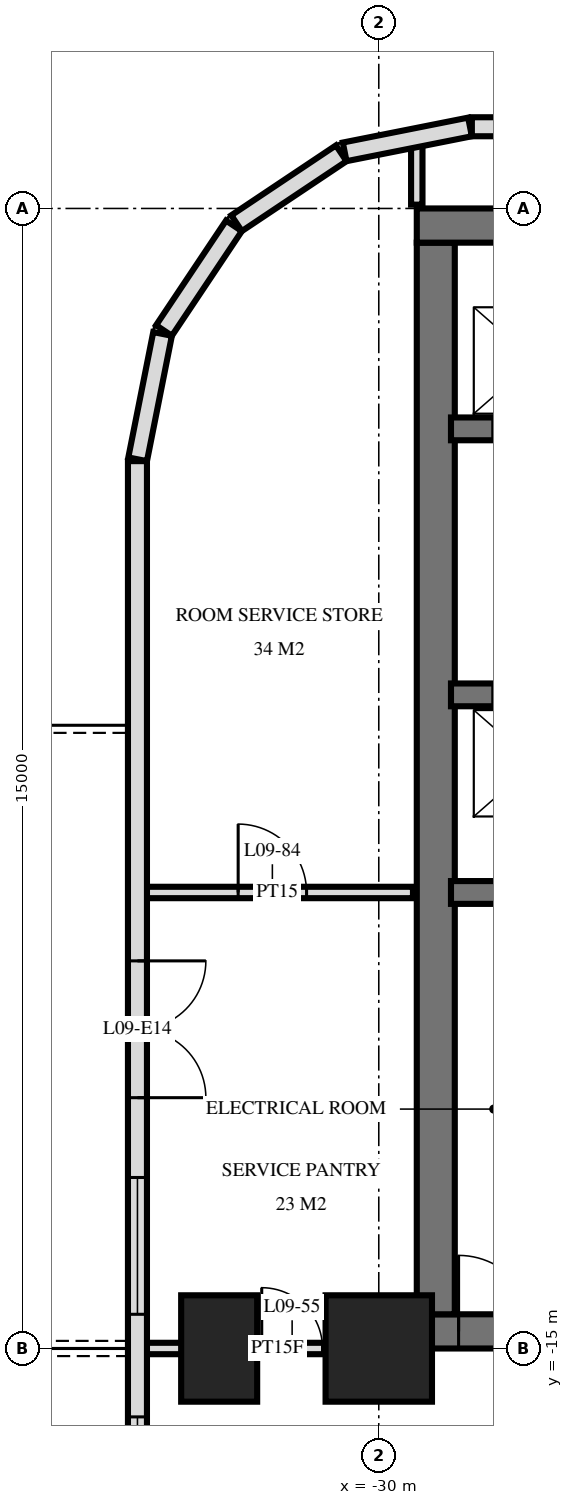
"""IFC4 building model, lengths in metres.
Left out: names, types, materials, properties, quantities, classifications, styles, units other than length and angle.
Written with IfcOpenShell. Run it as: python <this file> out.ifc"""

import sys

from ifc_helpers import new_model, si_unit, direction, frame, frame_2d, origin, origin_2d, place, context, subcontext, project, spatial, rectangle, extrude, element, fill, save


model = new_model("IFC4")
c1 = context("Model", 3, precision=1e-05, world=origin(), true_north=direction((0.0, 1.0)))
c2 = subcontext(c1, "Body", "Model", "MODEL_VIEW")
j1 = project(units=[si_unit("LENGTHUNIT", "METRE"), si_unit("PLANEANGLEUNIT", "RADIAN")], contexts=[c1])
p1 = place(None, origin())
s1 = spatial("IfcSite", under=j1, at=p1, CompositionType="ELEMENT")
p2 = place(p1, origin())
s2 = spatial("IfcBuilding", under=s1, at=p2, CompositionType="ELEMENT")
p3 = place(p2, frame((0.0, 0.0, 42.0)))
s3 = spatial("IfcBuildingStorey", under=s2, at=p3, CompositionType="ELEMENT", Elevation=42.0)
p4 = place(p3, frame((-32.1, -15.0, 0.0), z_axis=(0.0, 0.0, 1.0), x_axis=(0.0, 1.0, 0.0)))
e1 = element("IfcColumn", 1, at=p4, inside=s3, PredefinedType="COLUMN", context=c2, shape_type="SweptSolid", body=[
    extrude(rectangle(XDim=1.4, YDim=1.0, at=origin_2d()), origin(), (0.0, 0.0, 1.0), 3.6),
])
p5 = place(p3, frame((-30.0, -15.0, 0.0), z_axis=(0.0, 0.0, 1.0), x_axis=(1.0, 0.0, 0.0)))
e2 = element("IfcColumn", 2, at=p5, inside=s3, PredefinedType="COLUMN", context=c2, shape_type="SweptSolid", body=[
    extrude(rectangle(XDim=1.4, YDim=1.4, at=origin_2d()), origin(), (0.0, 0.0, 1.0), 3.6),
])
p6 = place(p3, frame((-29.5, -0.225, 0.0), z_axis=(0.0, 0.0, 1.0), x_axis=(1.0, 0.0, 0.0)))
e3 = element("IfcWall", 3, at=p6, inside=s3, PredefinedType="SHEAR", context=c2, shape_type="SweptSolid", body=[
    extrude(rectangle(XDim=19.5, YDim=0.45, at=frame_2d((9.75, 0.0))), origin(), (0.0, 0.0, 1.0), 3.6),
])
p7 = place(p3, frame((-29.5, -14.775, 0.0), z_axis=(0.0, 0.0, 1.0), x_axis=(1.0, 0.0, 0.0)))
e4 = element("IfcWall", 4, at=p7, inside=s3, PredefinedType="SHEAR", context=c2, shape_type="SweptSolid", body=[
    extrude(rectangle(XDim=19.5, YDim=0.45, at=frame_2d((9.75, 0.0))), origin(), (0.0, 0.0, 1.0), 3.6),
])
p8 = place(p7, frame((11.2, 0.0, 0.0)))
e5 = element("IfcOpeningElement", 5, at=p8, cuts=e4, PredefinedType="OPENING", context=c2, shape_type="SweptSolid", body=[
    extrude(rectangle(XDim=1.2, YDim=2.1, at=frame_2d((0.6, 1.05))), frame((0.0, 0.235, 0.0), z_axis=(0.0, -1.0, 0.0), x_axis=(1.0, 0.0, 0.0)), (0.0, 0.0, 1.0), 0.47),
])
p9 = place(p7, frame((14.25, 0.0, 0.0)))
e6 = element("IfcOpeningElement", 6, at=p9, cuts=e4, PredefinedType="OPENING", context=c2, shape_type="SweptSolid", body=[
    extrude(rectangle(XDim=1.1, YDim=2.1, at=frame_2d((0.55, 1.05))), frame((0.0, 0.235, 0.0), z_axis=(0.0, -1.0, 0.0), x_axis=(1.0, 0.0, 0.0)), (0.0, 0.0, 1.0), 0.47),
])
p10 = place(p7, frame((8.5, 0.0, 0.0)))
e7 = element("IfcOpeningElement", 7, at=p10, cuts=e4, PredefinedType="OPENING", context=c2, shape_type="SweptSolid", body=[
    extrude(rectangle(XDim=0.9, YDim=2.1, at=frame_2d((0.45, 1.05))), frame((0.0, 0.235, 0.0), z_axis=(0.0, -1.0, 0.0), x_axis=(1.0, 0.0, 0.0)), (0.0, 0.0, 1.0), 0.47),
])
p11 = place(p7, frame((6.05, 0.0, 0.0)))
e8 = element("IfcOpeningElement", 8, at=p11, cuts=e4, PredefinedType="OPENING", context=c2, shape_type="SweptSolid", body=[
    extrude(rectangle(XDim=1.0, YDim=2.1, at=frame_2d((0.5, 1.05))), frame((0.0, 0.235, 0.0), z_axis=(0.0, -1.0, 0.0), x_axis=(1.0, 0.0, 0.0)), (0.0, 0.0, 1.0), 0.47),
])
p12 = place(p7, frame((3.587, 0.0, 0.0)))
e9 = element("IfcOpeningElement", 9, at=p12, cuts=e4, PredefinedType="OPENING", context=c2, shape_type="SweptSolid", body=[
    extrude(rectangle(XDim=1.0, YDim=2.1, at=frame_2d((0.5, 1.05))), frame((0.0, 0.235, 0.0), z_axis=(0.0, -1.0, 0.0), x_axis=(1.0, 0.0, 0.0)), (0.0, 0.0, 1.0), 0.47),
])
p13 = place(p7, frame((1.85, 0.0, 0.0)))
e10 = element("IfcOpeningElement", 10, at=p13, cuts=e4, PredefinedType="OPENING", context=c2, shape_type="SweptSolid", body=[
    extrude(rectangle(XDim=1.0, YDim=2.1, at=frame_2d((0.5, 1.05))), frame((0.0, 0.235, 0.0), z_axis=(0.0, -1.0, 0.0), x_axis=(1.0, 0.0, 0.0)), (0.0, 0.0, 1.0), 0.47),
])
p14 = place(p7, frame((0.55, 0.0, 0.0)))
e11 = element("IfcOpeningElement", 11, at=p14, cuts=e4, PredefinedType="OPENING", context=c2, shape_type="SweptSolid", body=[
    extrude(rectangle(XDim=1.0, YDim=2.1, at=frame_2d((0.5, 1.05))), frame((0.0, 0.235, 0.0), z_axis=(0.0, -1.0, 0.0), x_axis=(1.0, 0.0, 0.0)), (0.0, 0.0, 1.0), 0.47),
])
p15 = place(p3, frame((-29.25, -14.55, 0.0), z_axis=(0.0, 0.0, 1.0), x_axis=(0.0, 1.0, 0.0)))
e12 = element("IfcWall", 12, at=p15, inside=s3, PredefinedType="SHEAR", context=c2, shape_type="SweptSolid", body=[
    extrude(rectangle(XDim=14.1, YDim=0.5, at=frame_2d((7.05, 0.0))), origin(), (0.0, 0.0, 1.0), 3.6),
])
p16 = place(p3, frame((-29.05, -2.9, 0.0), z_axis=(0.0, 0.0, 1.0), x_axis=(1.0, 0.0, 0.0)))
e13 = element("IfcWall", 13, at=p16, inside=s3, PredefinedType="SHEAR", context=c2, shape_type="SweptSolid", body=[
    extrude(rectangle(XDim=18.7, YDim=0.3, at=frame_2d((9.35, 0.0))), origin(), (0.0, 0.0, 1.0), 3.6),
])
p17 = place(p16, frame((2.95, 0.0, 0.0)))
e14 = element("IfcOpeningElement", 14, at=p17, cuts=e13, PredefinedType="OPENING", context=c2, shape_type="SweptSolid", body=[
    extrude(rectangle(XDim=1.1, YDim=2.1, at=frame_2d((0.55, 1.05))), frame((0.0, 0.16, 0.0), z_axis=(0.0, -1.0, 0.0), x_axis=(1.0, 0.0, 0.0)), (0.0, 0.0, 1.0), 0.32),
])
p18 = place(p16, frame((0.55, 0.0, 0.0)))
e15 = element("IfcOpeningElement", 15, at=p18, cuts=e13, PredefinedType="OPENING", context=c2, shape_type="SweptSolid", body=[
    extrude(rectangle(XDim=1.1, YDim=2.1, at=frame_2d((0.55, 1.05))), frame((0.0, 0.16, 0.0), z_axis=(0.0, -1.0, 0.0), x_axis=(1.0, 0.0, 0.0)), (0.0, 0.0, 1.0), 0.32),
])
p19 = place(p16, frame((10.9, 0.0, 0.0)))
e16 = element("IfcOpeningElement", 16, at=p19, cuts=e13, PredefinedType="OPENING", context=c2, shape_type="SweptSolid", body=[
    extrude(rectangle(XDim=0.9, YDim=2.1, at=frame_2d((0.45, 1.05))), frame((0.0, 0.16, 0.0), z_axis=(0.0, -1.0, 0.0), x_axis=(1.0, 0.0, 0.0)), (0.0, 0.0, 1.0), 0.32),
])
p20 = place(p16, frame((16.85, 0.0, 0.0)))
e17 = element("IfcOpeningElement", 17, at=p20, cuts=e13, PredefinedType="OPENING", context=c2, shape_type="SweptSolid", body=[
    extrude(rectangle(XDim=1.0, YDim=2.1, at=frame_2d((0.5, 1.05))), frame((0.0, 0.16, 0.0), z_axis=(0.0, -1.0, 0.0), x_axis=(1.0, 0.0, 0.0)), (0.0, 0.0, 1.0), 0.32),
])
p21 = place(p16, frame((14.312, 0.0, 0.0)))
e18 = element("IfcOpeningElement", 18, at=p21, cuts=e13, PredefinedType="OPENING", context=c2, shape_type="SweptSolid", body=[
    extrude(rectangle(XDim=1.0, YDim=2.1, at=frame_2d((0.5, 1.05))), frame((0.0, 0.16, 0.0), z_axis=(0.0, -1.0, 0.0), x_axis=(1.0, 0.0, 0.0)), (0.0, 0.0, 1.0), 0.32),
])
p22 = place(p16, frame((12.887, 0.0, 0.0)))
e19 = element("IfcOpeningElement", 19, at=p22, cuts=e13, PredefinedType="OPENING", context=c2, shape_type="SweptSolid", body=[
    extrude(rectangle(XDim=1.0, YDim=2.1, at=frame_2d((0.5, 1.05))), frame((0.0, 0.16, 0.0), z_axis=(0.0, -1.0, 0.0), x_axis=(1.0, 0.0, 0.0)), (0.0, 0.0, 1.0), 0.32),
])
p23 = place(p16, frame((5.6, 0.0, 0.0)))
e20 = element("IfcOpeningElement", 20, at=p23, cuts=e13, PredefinedType="OPENING", context=c2, shape_type="SweptSolid", body=[
    extrude(rectangle(XDim=1.0, YDim=2.1, at=frame_2d((0.5, 1.05))), frame((0.0, 0.16, 0.0), z_axis=(0.0, -1.0, 0.0), x_axis=(1.0, 0.0, 0.0)), (0.0, 0.0, 1.0), 0.32),
])
p24 = place(p3, frame((-29.05, -6.4, 0.0), z_axis=(0.0, 0.0, 1.0), x_axis=(1.0, 0.0, 0.0)))
e21 = element("IfcWall", 21, at=p24, inside=s3, PredefinedType="SHEAR", context=c2, shape_type="SweptSolid", body=[
    extrude(rectangle(XDim=18.7, YDim=0.3, at=frame_2d((9.35, 0.0))), origin(), (0.0, 0.0, 1.0), 3.6),
])
p25 = place(p24, frame((2.95, 0.0, 0.0)))
e22 = element("IfcOpeningElement", 22, at=p25, cuts=e21, PredefinedType="OPENING", context=c2, shape_type="SweptSolid", body=[
    extrude(rectangle(XDim=1.1, YDim=2.1, at=frame_2d((0.55, 1.05))), frame((0.0, 0.16, 0.0), z_axis=(0.0, -1.0, 0.0), x_axis=(1.0, 0.0, 0.0)), (0.0, 0.0, 1.0), 0.32),
])
p26 = place(p24, frame((0.55, 0.0, 0.0)))
e23 = element("IfcOpeningElement", 23, at=p26, cuts=e21, PredefinedType="OPENING", context=c2, shape_type="SweptSolid", body=[
    extrude(rectangle(XDim=1.1, YDim=2.1, at=frame_2d((0.55, 1.05))), frame((0.0, 0.16, 0.0), z_axis=(0.0, -1.0, 0.0), x_axis=(1.0, 0.0, 0.0)), (0.0, 0.0, 1.0), 0.32),
])
p27 = place(p24, frame((10.8, 0.0, 0.0)))
e24 = element("IfcOpeningElement", 24, at=p27, cuts=e21, PredefinedType="OPENING", context=c2, shape_type="SweptSolid", body=[
    extrude(rectangle(XDim=1.1, YDim=2.1, at=frame_2d((0.55, 1.05))), frame((0.0, 0.16, 0.0), z_axis=(0.0, -1.0, 0.0), x_axis=(1.0, 0.0, 0.0)), (0.0, 0.0, 1.0), 0.32),
])
p28 = place(p24, frame((5.6, 0.0, 0.0)))
e25 = element("IfcOpeningElement", 25, at=p28, cuts=e21, PredefinedType="OPENING", context=c2, shape_type="SweptSolid", body=[
    extrude(rectangle(XDim=1.0, YDim=2.1, at=frame_2d((0.5, 1.05))), frame((0.0, 0.16, 0.0), z_axis=(0.0, -1.0, 0.0), x_axis=(1.0, 0.0, 0.0)), (0.0, 0.0, 1.0), 0.32),
])
p29 = place(p3, frame((-29.05, -9.0, 0.0), z_axis=(0.0, 0.0, 1.0), x_axis=(1.0, 0.0, 0.0)))
e26 = element("IfcWall", 26, at=p29, inside=s3, PredefinedType="SHEAR", context=c2, shape_type="SweptSolid", body=[
    extrude(rectangle(XDim=18.7, YDim=0.3, at=frame_2d((9.35, 0.0))), origin(), (0.0, 0.0, 1.0), 3.6),
])
p30 = place(p29, frame((13.8, 0.0, 0.0)))
e27 = element("IfcOpeningElement", 27, at=p30, cuts=e26, PredefinedType="OPENING", context=c2, shape_type="SweptSolid", body=[
    extrude(rectangle(XDim=1.1, YDim=2.1, at=frame_2d((0.55, 1.05))), frame((0.0, 0.16, 0.0), z_axis=(0.0, -1.0, 0.0), x_axis=(1.0, 0.0, 0.0)), (0.0, 0.0, 1.0), 0.32),
])
p31 = place(p3, frame((28.775, 1.075, 0.0), z_axis=(0.0, 0.0, 1.0), x_axis=(-1.0, 0.0, 0.0)))
e28 = element("IfcWall", 28, at=p31, inside=s3, PredefinedType="SOLIDWALL", context=c2, shape_type="SweptSolid", body=[
    extrude(rectangle(XDim=57.551, YDim=0.25, at=frame_2d((28.775, 0.0))), origin(), (0.0, 0.0, 1.0), 3.32),
])
p32 = place(p31, frame((24.275, 0.0, 0.3)))
e29 = element("IfcOpeningElement", 29, at=p32, cuts=e28, PredefinedType="OPENING", context=c2, shape_type="SweptSolid", body=[
    extrude(rectangle(XDim=2.4, YDim=2.1, at=frame_2d((1.2, 1.05))), frame((0.0, 0.135, 0.0), z_axis=(0.0, -1.0, 0.0), x_axis=(1.0, 0.0, 0.0)), (0.0, 0.0, 1.0), 0.27),
])
p33 = place(p31, frame((35.325, 0.0, 0.3)))
e30 = element("IfcOpeningElement", 30, at=p33, cuts=e28, PredefinedType="OPENING", context=c2, shape_type="SweptSolid", body=[
    extrude(rectangle(XDim=2.4, YDim=2.1, at=frame_2d((1.2, 1.05))), frame((0.0, 0.135, 0.0), z_axis=(0.0, -1.0, 0.0), x_axis=(1.0, 0.0, 0.0)), (0.0, 0.0, 1.0), 0.27),
])
p34 = place(p3, frame((-28.8, 1.073, 0.0), z_axis=(0.0, 0.0, 1.0), x_axis=(-0.980803419081, -0.194999110559, 0.0)))
e31 = element("IfcWall", 31, at=p34, inside=s3, PredefinedType="SOLIDWALL", context=c2, shape_type="SweptSolid", body=[
    extrude(rectangle(XDim=1.681, YDim=0.25, at=frame_2d((0.841, 0.0))), origin(), (0.0, 0.0, 1.0), 3.32),
])
for number, where, z_axis, x_axis in (
    (32, (-30.494, 0.726, 0.0), (0.0, 0.0, 1.0), (-0.831, -0.556, 0.0)),
    (33, (-31.906, -0.229, 0.0), (0.0, 0.0, 1.0), (-0.556, -0.831, 0.0)),
):
    element("IfcWall", number, at=place(p3, frame(where, z_axis=z_axis, x_axis=x_axis)), inside=s3, PredefinedType="SOLIDWALL", context=c2, shape_type="SweptSolid", body=[
        extrude(rectangle(XDim=1.656, YDim=0.25, at=frame_2d((0.828, 0.0))), origin(), (0.0, 0.0, 1.0), 3.32),
    ])
p35 = place(p3, frame((-32.844, -1.651, 0.0), z_axis=(0.0, 0.0, 1.0), x_axis=(-0.19513878023, -0.980775640221, 0.0)))
e34 = element("IfcWall", 34, at=p35, inside=s3, PredefinedType="SOLIDWALL", context=c2, shape_type="SweptSolid", body=[
    extrude(rectangle(XDim=1.681, YDim=0.25, at=frame_2d((0.841, 0.0))), origin(), (0.0, 0.0, 1.0), 3.32),
])
p36 = place(p3, frame((-33.175, -3.325, 0.0), z_axis=(0.0, 0.0, 1.0), x_axis=(0.0, -1.0, 0.0)))
e35 = element("IfcWall", 35, at=p36, inside=s3, PredefinedType="SOLIDWALL", context=c2, shape_type="SweptSolid", body=[
    extrude(rectangle(XDim=21.551, YDim=0.25, at=frame_2d((10.775, 0.0))), origin(), (0.0, 0.0, 1.0), 3.32),
])
p37 = place(p36, frame((6.575, 0.0, 0.0)))
e36 = element("IfcOpeningElement", 36, at=p37, cuts=e35, PredefinedType="OPENING", context=c2, shape_type="SweptSolid", body=[
    extrude(rectangle(XDim=1.8, YDim=2.4, at=frame_2d((0.9, 1.2))), frame((0.0, 0.135, 0.0), z_axis=(0.0, -1.0, 0.0), x_axis=(1.0, 0.0, 0.0)), (0.0, 0.0, 1.0), 0.27),
])
p38 = place(p36, frame((9.425, 0.0, 0.3)))
e37 = element("IfcOpeningElement", 37, at=p38, cuts=e35, PredefinedType="OPENING", context=c2, shape_type="SweptSolid", body=[
    extrude(rectangle(XDim=1.8, YDim=2.1, at=frame_2d((0.9, 1.05))), frame((0.0, 0.135, 0.0), z_axis=(0.0, -1.0, 0.0), x_axis=(1.0, 0.0, 0.0)), (0.0, 0.0, 1.0), 0.27),
])
p39 = place(p36, frame((12.575, 0.0, 0.3)))
e38 = element("IfcOpeningElement", 38, at=p39, cuts=e35, PredefinedType="OPENING", context=c2, shape_type="SweptSolid", body=[
    extrude(rectangle(XDim=1.2, YDim=2.1, at=frame_2d((0.6, 1.05))), frame((0.0, 0.135, 0.0), z_axis=(0.0, -1.0, 0.0), x_axis=(1.0, 0.0, 0.0)), (0.0, 0.0, 1.0), 0.27),
])
p40 = place(p36, frame((15.6, 0.0, 0.0)))
e39 = element("IfcOpeningElement", 39, at=p40, cuts=e35, PredefinedType="OPENING", context=c2, shape_type="SweptSolid", body=[
    extrude(rectangle(XDim=1.8, YDim=2.4, at=frame_2d((0.9, 1.2))), frame((0.0, 0.135, 0.0), z_axis=(0.0, -1.0, 0.0), x_axis=(1.0, 0.0, 0.0)), (0.0, 0.0, 1.0), 0.27),
])
p41 = place(p36, frame((19.275, 0.0, 0.0)))
e40 = element("IfcOpeningElement", 40, at=p41, cuts=e35, PredefinedType="OPENING", context=c2, shape_type="SweptSolid", body=[
    extrude(rectangle(XDim=1.8, YDim=2.4, at=frame_2d((0.9, 1.2))), frame((0.0, 0.135, 0.0), z_axis=(0.0, -1.0, 0.0), x_axis=(1.0, 0.0, 0.0)), (0.0, 0.0, 1.0), 0.27),
])
p42 = place(p3, frame((-29.5, 0.05, 0.0), z_axis=(0.0, 0.0, 1.0), x_axis=(0.0, 1.0, 0.0)))
e41 = element("IfcWall", 41, at=p42, inside=s3, PredefinedType="PARTITIONING", context=c2, shape_type="SweptSolid", body=[
    extrude(rectangle(XDim=0.827, YDim=0.15, at=frame_2d((0.414, 0.0))), origin(), (0.0, 0.0, 1.0), 3.32),
])
p43 = place(p3, frame((-33.12, -15.0, 0.0), z_axis=(0.0, 0.0, 1.0), x_axis=(1.0, 0.0, 0.0)))
e42 = element("IfcWall", 42, at=p43, inside=s3, PredefinedType="PARTITIONING", context=c2, shape_type="SweptSolid", body=[
    extrude(rectangle(XDim=3.57, YDim=0.15, at=frame_2d((1.785, 0.0))), origin(), (0.0, 0.0, 1.0), 3.32),
])
p44 = place(p43, frame((1.58, 0.0, 0.0)))
e43 = element("IfcOpeningElement", 43, at=p44, cuts=e42, PredefinedType="OPENING", context=c2, shape_type="SweptSolid", body=[
    extrude(rectangle(XDim=0.8, YDim=2.1, at=frame_2d((0.4, 1.05))), frame((0.0, 0.085, 0.0), z_axis=(0.0, -1.0, 0.0), x_axis=(1.0, 0.0, 0.0)), (0.0, 0.0, 1.0), 0.17),
])
p45 = place(p3, frame((-33.12, -9.0, 0.0), z_axis=(0.0, 0.0, 1.0), x_axis=(1.0, 0.0, 0.0)))
e44 = element("IfcWall", 44, at=p45, inside=s3, PredefinedType="PARTITIONING", context=c2, shape_type="SweptSolid", body=[
    extrude(rectangle(XDim=3.57, YDim=0.15, at=frame_2d((1.785, 0.0))), origin(), (0.0, 0.0, 1.0), 3.32),
])
p46 = place(p45, frame((1.27, 0.0, 0.0)))
e45 = element("IfcOpeningElement", 45, at=p46, cuts=e44, PredefinedType="OPENING", context=c2, shape_type="SweptSolid", body=[
    extrude(rectangle(XDim=0.9, YDim=2.1, at=frame_2d((0.45, 1.05))), frame((0.0, 0.085, 0.0), z_axis=(0.0, -1.0, 0.0), x_axis=(1.0, 0.0, 0.0)), (0.0, 0.0, 1.0), 0.17),
])
p47 = place(p37, origin())
e46 = element("IfcDoor", 46, at=p47, inside=s3, OperationType="DOUBLE_DOOR_SINGLE_SWING", PredefinedType="DOOR", context=c2, shape_type="SweptSolid", body=[
    extrude(rectangle(XDim=1.8, YDim=2.4, at=frame_2d((0.9, 1.2))), frame((0.0, 0.025, 0.0), z_axis=(0.0, -1.0, 0.0), x_axis=(1.0, 0.0, 0.0)), (0.0, 0.0, 1.0), 0.05),
])
fill(e36, e46)
p48 = place(p38, origin())
e47 = element("IfcWindow", 47, at=p48, inside=s3, PartitioningType="SINGLE_PANEL", PredefinedType="WINDOW", context=c2, shape_type="SweptSolid", body=[
    extrude(rectangle(XDim=1.8, YDim=2.1, at=frame_2d((0.9, 1.05))), frame((0.0, 0.03, 0.0), z_axis=(0.0, -1.0, 0.0), x_axis=(1.0, 0.0, 0.0)), (0.0, 0.0, 1.0), 0.06),
])
fill(e37, e47)
p49 = place(p39, origin())
e48 = element("IfcWindow", 48, at=p49, inside=s3, PartitioningType="SINGLE_PANEL", PredefinedType="WINDOW", context=c2, shape_type="SweptSolid", body=[
    extrude(rectangle(XDim=1.2, YDim=2.1, at=frame_2d((0.6, 1.05))), frame((0.0, 0.03, 0.0), z_axis=(0.0, -1.0, 0.0), x_axis=(1.0, 0.0, 0.0)), (0.0, 0.0, 1.0), 0.06),
])
fill(e38, e48)
p50 = place(p14, origin())
e49 = element("IfcDoor", 49, at=p50, inside=s3, OperationType="SINGLE_SWING_RIGHT", PredefinedType="DOOR", context=c2, shape_type="SweptSolid", body=[
    extrude(rectangle(XDim=1.0, YDim=2.1, at=frame_2d((0.5, 1.05))), frame((0.0, 0.025, 0.0), z_axis=(0.0, -1.0, 0.0), x_axis=(1.0, 0.0, 0.0)), (0.0, 0.0, 1.0), 0.05),
])
fill(e11, e49)
p51 = place(p44, origin())
e50 = element("IfcDoor", 50, at=p51, inside=s3, OperationType="SINGLE_SWING_RIGHT", PredefinedType="DOOR", context=c2, shape_type="SweptSolid", body=[
    extrude(rectangle(XDim=0.8, YDim=2.1, at=frame_2d((0.4, 1.05))), frame((0.0, 0.025, 0.0), z_axis=(0.0, -1.0, 0.0), x_axis=(1.0, 0.0, 0.0)), (0.0, 0.0, 1.0), 0.05),
])
fill(e43, e50)
p52 = place(p46, origin())
e51 = element("IfcDoor", 51, at=p52, inside=s3, OperationType="SINGLE_SWING_RIGHT", PredefinedType="DOOR", context=c2, shape_type="SweptSolid", body=[
    extrude(rectangle(XDim=0.9, YDim=2.1, at=frame_2d((0.45, 1.05))), frame((0.0, 0.025, 0.0), z_axis=(0.0, -1.0, 0.0), x_axis=(1.0, 0.0, 0.0)), (0.0, 0.0, 1.0), 0.05),
])
fill(e45, e51)
save(model, sys.argv[1])
